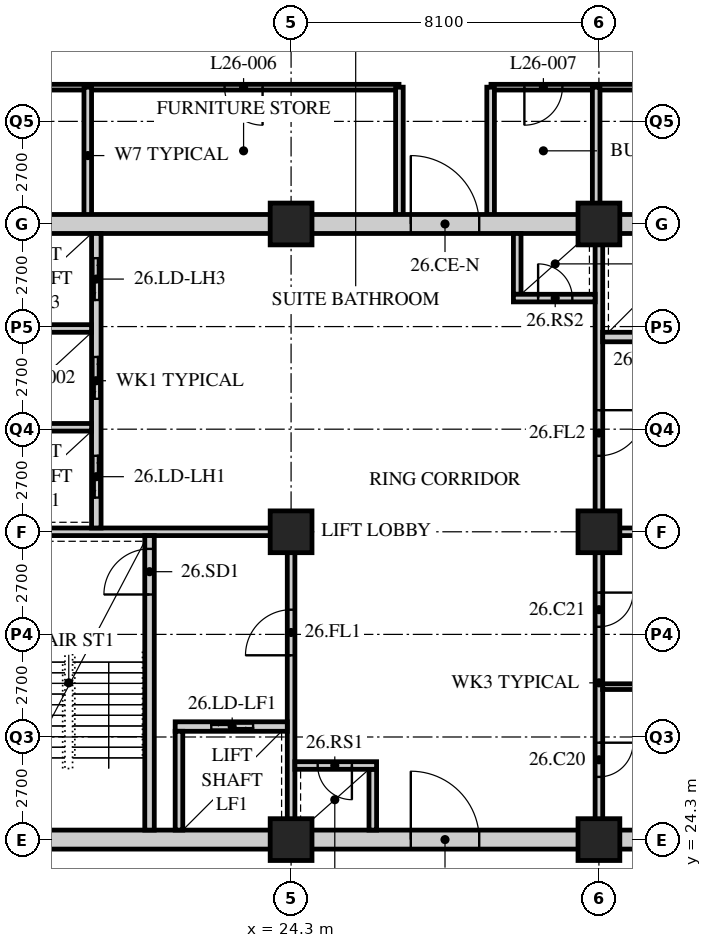
"""IFC4 building model, lengths in metres.
Left out: names, types, materials, properties, quantities, classifications, styles, units other than length and angle.
Written with IfcOpenShell. Run it as: python <this file> out.ifc"""

import sys

from ifc_helpers import new_model, si_unit, direction, frame, frame_2d, origin, origin_2d, place, context, subcontext, project, spatial, rectangle, hollow_rectangle, extrude, element, fill, save


model = new_model("IFC4")
c1 = context("Model", 3, precision=1e-05, world=origin(), true_north=direction((0.0, 1.0)))
c2 = subcontext(c1, "Body", "Model", "MODEL_VIEW")
j1 = project(units=[si_unit("LENGTHUNIT", "METRE"), si_unit("PLANEANGLEUNIT", "RADIAN")], contexts=[c1])
p1 = place(None, origin())
s1 = spatial("IfcSite", under=j1, at=p1, CompositionType="ELEMENT")
p2 = place(p1, origin())
s2 = spatial("IfcBuilding", under=s1, at=p2, CompositionType="ELEMENT")
p3 = place(p2, frame((0.0, 0.0, 106.8)))
s3 = spatial("IfcBuildingStorey", under=s2, at=p3, CompositionType="ELEMENT", Elevation=106.8)
for number, where, z_axis, x_axis in (
    (1, (24.3, 24.3, 0.0), (0.0, 0.0, 1.0), (1.0, 0.0, 0.0)),
    (2, (24.3, 32.4, 0.0), (0.0, 0.0, 1.0), (1.0, 0.0, 0.0)),
    (3, (24.3, 40.5, 0.0), (0.0, 0.0, 1.0), (1.0, 0.0, 0.0)),
    (4, (32.4, 24.3, 0.0), (0.0, 0.0, 1.0), (1.0, 0.0, 0.0)),
    (5, (32.4, 32.4, 0.0), (0.0, 0.0, 1.0), (1.0, 0.0, 0.0)),
    (6, (32.4, 40.5, 0.0), (0.0, 0.0, 1.0), (1.0, 0.0, 0.0)),
):
    element("IfcColumn", number, at=place(p3, frame(where, z_axis=z_axis, x_axis=x_axis)), inside=s3, PredefinedType="COLUMN", context=c2, shape_type="SweptSolid", body=[
        extrude(hollow_rectangle(XDim=1.1, YDim=1.1, WallThickness=0.1, at=origin_2d()), origin(), (0.0, 0.0, 1.0), 3.4),
    ])
p4 = place(p3, frame((42.75, 44.1, 0.0), z_axis=(0.0, 0.0, 1.0), x_axis=(-1.0, 0.0, 0.0)))
e7 = element("IfcWall", 7, at=p4, inside=s3, PredefinedType="PARTITIONING", context=c2, shape_type="SweptSolid", body=[
    extrude(rectangle(XDim=13.19, YDim=0.15, at=frame_2d((6.595, 0.0))), origin(), (0.0, 0.0, 1.0), 3.19),
])
p5 = place(p4, frame((11.311, 0.0, 0.0)))
e8 = element("IfcOpeningElement", 8, at=p5, cuts=e7, PredefinedType="OPENING", context=c2, shape_type="SweptSolid", body=[
    extrude(rectangle(XDim=1.0, YDim=2.1, at=frame_2d((0.5, 1.05))), frame((0.0, 0.085, 0.0), z_axis=(0.0, -1.0, 0.0), x_axis=(1.0, 0.0, 0.0)), (0.0, 0.0, 1.0), 0.17),
])
p6 = place(p4, frame((4.711, 0.0, 0.0)))
e9 = element("IfcOpeningElement", 9, at=p6, cuts=e7, PredefinedType="OPENING", context=c2, shape_type="SweptSolid", body=[
    extrude(rectangle(XDim=1.0, YDim=2.1, at=frame_2d((0.5, 1.05))), frame((0.0, 0.085, 0.0), z_axis=(0.0, -1.0, 0.0), x_axis=(1.0, 0.0, 0.0)), (0.0, 0.0, 1.0), 0.17),
])
p7 = place(p3, frame((27.14, 44.1, 0.0), z_axis=(0.0, 0.0, 1.0), x_axis=(-1.0, 0.0, 0.0)))
e10 = element("IfcWall", 10, at=p7, inside=s3, PredefinedType="PARTITIONING", context=c2, shape_type="SweptSolid", body=[
    extrude(rectangle(XDim=13.19, YDim=0.15, at=frame_2d((6.595, 0.0))), origin(), (0.0, 0.0, 1.0), 3.19),
])
p8 = place(p7, frame((10.19, 0.0, 0.0)))
e11 = element("IfcOpeningElement", 11, at=p8, cuts=e10, PredefinedType="OPENING", context=c2, shape_type="SweptSolid", body=[
    extrude(rectangle(XDim=1.0, YDim=2.1, at=frame_2d((0.5, 1.05))), frame((0.0, 0.085, 0.0), z_axis=(0.0, -1.0, 0.0), x_axis=(1.0, 0.0, 0.0)), (0.0, 0.0, 1.0), 0.17),
])
p9 = place(p7, frame((3.59, 0.0, 0.0)))
e12 = element("IfcOpeningElement", 12, at=p9, cuts=e10, PredefinedType="OPENING", context=c2, shape_type="SweptSolid", body=[
    extrude(rectangle(XDim=1.0, YDim=2.1, at=frame_2d((0.5, 1.05))), frame((0.0, 0.085, 0.0), z_axis=(0.0, -1.0, 0.0), x_axis=(1.0, 0.0, 0.0)), (0.0, 0.0, 1.0), 0.17),
])
p10 = place(p3, frame((18.95, 44.1, 0.0), z_axis=(0.0, 0.0, 1.0), x_axis=(0.0, -1.0, 0.0)))
e13 = element("IfcWall", 13, at=p10, inside=s3, PredefinedType="SOLIDWALL", context=c2, shape_type="SweptSolid", body=[
    extrude(rectangle(XDim=3.6, YDim=0.2, at=frame_2d((1.8, 0.0))), origin(), (0.0, 0.0, 1.0), 3.19),
])
p11 = place(p3, frame((32.328, 44.1, 0.0), z_axis=(0.0, 0.0, 1.0), x_axis=(0.0, -1.0, 0.0)))
e14 = element("IfcWall", 14, at=p11, inside=s3, PredefinedType="SOLIDWALL", context=c2, shape_type="SweptSolid", body=[
    extrude(rectangle(XDim=3.6, YDim=0.2, at=frame_2d((1.8, 0.0))), origin(), (0.0, 0.0, 1.0), 2.578),
])
for number, where, z_axis, x_axis in (
    (15, (27.15, 40.5, 0.0), (0.0, 0.0, 1.0), (0.0, 1.0, 0.0)),
    (16, (29.55, 40.5, 0.0), (0.0, 0.0, 1.0), (0.0, 1.0, 0.0)),
):
    element("IfcWall", number, at=place(p3, frame(where, z_axis=z_axis, x_axis=x_axis)), inside=s3, PredefinedType="SOLIDWALL", context=c2, shape_type="SweptSolid", body=[
        extrude(rectangle(XDim=3.6, YDim=0.2, at=frame_2d((1.8, 0.0))), origin(), (0.0, 0.0, 1.0), 3.19),
    ])
p12 = place(p3, frame((15.95, 24.3, 0.0), z_axis=(0.0, 0.0, 1.0), x_axis=(1.0, 0.0, 0.0)))
e17 = element("IfcWall", 17, at=p12, inside=s3, PredefinedType="SOLIDWALL", context=c2, shape_type="SweptSolid", body=[
    extrude(rectangle(XDim=24.8, YDim=0.5, at=frame_2d((12.4, 0.0))), origin(), (0.0, 0.0, 1.0), 2.54),
])
p13 = place(p12, frame((11.5, 0.0, 0.0)))
e18 = element("IfcOpeningElement", 18, at=p13, cuts=e17, PredefinedType="OPENING", context=c2, shape_type="SweptSolid", body=[
    extrude(rectangle(XDim=1.8, YDim=2.4, at=frame_2d((0.9, 1.2))), frame((0.0, 0.26, 0.0), z_axis=(0.0, -1.0, 0.0), x_axis=(1.0, 0.0, 0.0)), (0.0, 0.0, 1.0), 0.52),
])
p14 = place(p3, frame((15.95, 40.5, 0.0), z_axis=(0.0, 0.0, 1.0), x_axis=(1.0, 0.0, 0.0)))
e19 = element("IfcWall", 19, at=p14, inside=s3, PredefinedType="SOLIDWALL", context=c2, shape_type="SweptSolid", body=[
    extrude(rectangle(XDim=24.8, YDim=0.5, at=frame_2d((12.4, 0.0))), origin(), (0.0, 0.0, 1.0), 2.54),
])
p15 = place(p14, frame((11.5, 0.0, 0.0)))
e20 = element("IfcOpeningElement", 20, at=p15, cuts=e19, PredefinedType="OPENING", context=c2, shape_type="SweptSolid", body=[
    extrude(rectangle(XDim=1.8, YDim=2.4, at=frame_2d((0.9, 1.2))), frame((0.0, 0.26, 0.0), z_axis=(0.0, -1.0, 0.0), x_axis=(1.0, 0.0, 0.0)), (0.0, 0.0, 1.0), 0.52),
])
p16 = place(p3, frame((16.45, 32.4, 0.0), z_axis=(0.0, 0.0, 1.0), x_axis=(1.0, 0.0, 0.0)))
e21 = element("IfcWall", 21, at=p16, inside=s3, PredefinedType="SOLIDWALL", context=c2, shape_type="SweptSolid", body=[
    extrude(rectangle(XDim=7.95, YDim=0.2, at=frame_2d((3.975, 0.0))), origin(), (0.0, 0.0, 1.0), 2.578),
])
p17 = place(p3, frame((24.3, 24.55, 0.0), z_axis=(0.0, 0.0, 1.0), x_axis=(0.0, 1.0, 0.0)))
e22 = element("IfcWall", 22, at=p17, inside=s3, PredefinedType="SOLIDWALL", context=c2, shape_type="SweptSolid", body=[
    extrude(rectangle(XDim=7.75, YDim=0.2, at=frame_2d((3.875, 0.0))), origin(), (0.0, 0.0, 1.0), 2.578),
])
p18 = place(p17, frame((4.6, 0.0, 0.0)))
e23 = element("IfcOpeningElement", 23, at=p18, cuts=e22, PredefinedType="OPENING", context=c2, shape_type="SweptSolid", body=[
    extrude(rectangle(XDim=1.2, YDim=2.1, at=frame_2d((0.6, 1.05))), frame((0.0, 0.11, 0.0), z_axis=(0.0, -1.0, 0.0), x_axis=(1.0, 0.0, 0.0)), (0.0, 0.0, 1.0), 0.22),
])
p19 = place(p3, frame((20.575, 24.55, 0.0), z_axis=(0.0, 0.0, 1.0), x_axis=(0.0, 1.0, 0.0)))
e24 = element("IfcWall", 24, at=p19, inside=s3, PredefinedType="SOLIDWALL", context=c2, shape_type="SweptSolid", body=[
    extrude(rectangle(XDim=7.75, YDim=0.25, at=frame_2d((3.875, 0.0))), origin(), (0.0, 0.0, 1.0), 3.19),
])
p20 = place(p19, frame((6.2, 0.0, 0.0)))
e25 = element("IfcOpeningElement", 25, at=p20, cuts=e24, PredefinedType="OPENING", context=c2, shape_type="SweptSolid", body=[
    extrude(rectangle(XDim=1.2, YDim=2.1, at=frame_2d((0.6, 1.05))), frame((0.0, 0.135, 0.0), z_axis=(0.0, -1.0, 0.0), x_axis=(1.0, 0.0, 0.0)), (0.0, 0.0, 1.0), 0.27),
])
p21 = place(p3, frame((21.25, 27.275, 0.0), z_axis=(0.0, 0.0, 1.0), x_axis=(1.0, 0.0, 0.0)))
e26 = element("IfcWall", 26, at=p21, inside=s3, PredefinedType="SOLIDWALL", context=c2, shape_type="SweptSolid", body=[
    extrude(rectangle(XDim=2.95, YDim=0.25, at=frame_2d((1.475, 0.0))), origin(), (0.0, 0.0, 1.0), 3.19),
])
p22 = place(p21, frame((0.95, 0.0, 0.0)))
e27 = element("IfcOpeningElement", 27, at=p22, cuts=e26, PredefinedType="OPENING", context=c2, shape_type="SweptSolid", body=[
    extrude(rectangle(XDim=1.1, YDim=2.4, at=frame_2d((0.55, 1.2))), frame((0.0, 0.135, 0.0), z_axis=(0.0, -1.0, 0.0), x_axis=(1.0, 0.0, 0.0)), (0.0, 0.0, 1.0), 0.27),
])
p23 = place(p3, frame((21.35, 24.55, 0.0), z_axis=(0.0, 0.0, 1.0), x_axis=(0.0, 1.0, 0.0)))
e28 = element("IfcWall", 28, at=p23, inside=s3, PredefinedType="SOLIDWALL", context=c2, shape_type="SweptSolid", body=[
    extrude(rectangle(XDim=2.6, YDim=0.2, at=frame_2d((1.3, 0.0))), origin(), (0.0, 0.0, 1.0), 3.19),
])
p24 = place(p3, frame((19.175, 32.5, 0.0), z_axis=(0.0, 0.0, 1.0), x_axis=(0.0, 1.0, 0.0)))
e29 = element("IfcWall", 29, at=p24, inside=s3, PredefinedType="SOLIDWALL", context=c2, shape_type="SweptSolid", body=[
    extrude(rectangle(XDim=7.75, YDim=0.25, at=frame_2d((3.875, 0.0))), origin(), (0.0, 0.0, 1.0), 3.19),
])
p25 = place(p24, frame((0.8, 0.0, 0.0)))
e30 = element("IfcOpeningElement", 30, at=p25, cuts=e29, PredefinedType="OPENING", context=c2, shape_type="SweptSolid", body=[
    extrude(rectangle(XDim=1.1, YDim=2.4, at=frame_2d((0.55, 1.2))), frame((0.0, 0.135, 0.0), z_axis=(0.0, -1.0, 0.0), x_axis=(1.0, 0.0, 0.0)), (0.0, 0.0, 1.0), 0.27),
])
p26 = place(p24, frame((3.4, 0.0, 0.0)))
e31 = element("IfcOpeningElement", 31, at=p26, cuts=e29, PredefinedType="OPENING", context=c2, shape_type="SweptSolid", body=[
    extrude(rectangle(XDim=1.1, YDim=2.4, at=frame_2d((0.55, 1.2))), frame((0.0, 0.135, 0.0), z_axis=(0.0, -1.0, 0.0), x_axis=(1.0, 0.0, 0.0)), (0.0, 0.0, 1.0), 0.27),
])
p27 = place(p24, frame((6.0, 0.0, 0.0)))
e32 = element("IfcOpeningElement", 32, at=p27, cuts=e29, PredefinedType="OPENING", context=c2, shape_type="SweptSolid", body=[
    extrude(rectangle(XDim=1.1, YDim=2.4, at=frame_2d((0.55, 1.2))), frame((0.0, 0.135, 0.0), z_axis=(0.0, -1.0, 0.0), x_axis=(1.0, 0.0, 0.0)), (0.0, 0.0, 1.0), 0.27),
])
for number, where, z_axis, x_axis in (
    (33, (16.45, 35.15, 0.0), (0.0, 0.0, 1.0), (1.0, 0.0, 0.0)),
    (34, (16.45, 37.75, 0.0), (0.0, 0.0, 1.0), (1.0, 0.0, 0.0)),
):
    element("IfcWall", number, at=place(p3, frame(where, z_axis=z_axis, x_axis=x_axis)), inside=s3, PredefinedType="SOLIDWALL", context=c2, shape_type="SweptSolid", body=[
        extrude(rectangle(XDim=2.6, YDim=0.2, at=frame_2d((1.3, 0.0))), origin(), (0.0, 0.0, 1.0), 3.19),
    ])
p28 = place(p3, frame((26.45, 24.55, 0.0), z_axis=(0.0, 0.0, 1.0), x_axis=(0.0, 1.0, 0.0)))
e35 = element("IfcWall", 35, at=p28, inside=s3, PredefinedType="SOLIDWALL", context=c2, shape_type="SweptSolid", body=[
    extrude(rectangle(XDim=1.6, YDim=0.2, at=frame_2d((0.8, 0.0))), origin(), (0.0, 0.0, 1.0), 3.19),
])
p29 = place(p3, frame((24.4, 26.25, 0.0), z_axis=(0.0, 0.0, 1.0), x_axis=(1.0, 0.0, 0.0)))
e36 = element("IfcWall", 36, at=p29, inside=s3, PredefinedType="SOLIDWALL", context=c2, shape_type="SweptSolid", body=[
    extrude(rectangle(XDim=2.15, YDim=0.2, at=frame_2d((1.075, 0.0))), origin(), (0.0, 0.0, 1.0), 3.19),
])
p30 = place(p29, frame((0.6, 0.0, 0.0)))
e37 = element("IfcOpeningElement", 37, at=p30, cuts=e36, PredefinedType="OPENING", context=c2, shape_type="SweptSolid", body=[
    extrude(rectangle(XDim=0.9, YDim=2.1, at=frame_2d((0.45, 1.05))), frame((0.0, 0.11, 0.0), z_axis=(0.0, -1.0, 0.0), x_axis=(1.0, 0.0, 0.0)), (0.0, 0.0, 1.0), 0.22),
])
p31 = place(p3, frame((32.3, 32.4, 0.0), z_axis=(0.0, 0.0, 1.0), x_axis=(1.0, 0.0, 0.0)))
e38 = element("IfcWall", 38, at=p31, inside=s3, PredefinedType="SOLIDWALL", context=c2, shape_type="SweptSolid", body=[
    extrude(rectangle(XDim=7.95, YDim=0.2, at=frame_2d((3.975, 0.0))), origin(), (0.0, 0.0, 1.0), 2.578),
])
p32 = place(p3, frame((32.4, 32.5, 0.0), z_axis=(0.0, 0.0, 1.0), x_axis=(0.0, 1.0, 0.0)))
e39 = element("IfcWall", 39, at=p32, inside=s3, PredefinedType="SOLIDWALL", context=c2, shape_type="SweptSolid", body=[
    extrude(rectangle(XDim=7.75, YDim=0.2, at=frame_2d((3.875, 0.0))), origin(), (0.0, 0.0, 1.0), 2.578),
])
p33 = place(p32, frame((1.9, 0.0, 0.0)))
e40 = element("IfcOpeningElement", 40, at=p33, cuts=e39, PredefinedType="OPENING", context=c2, shape_type="SweptSolid", body=[
    extrude(rectangle(XDim=1.2, YDim=2.1, at=frame_2d((0.6, 1.05))), frame((0.0, 0.11, 0.0), z_axis=(0.0, -1.0, 0.0), x_axis=(1.0, 0.0, 0.0)), (0.0, 0.0, 1.0), 0.22),
])
p34 = place(p3, frame((32.5, 37.525, 0.0), z_axis=(0.0, 0.0, 1.0), x_axis=(1.0, 0.0, 0.0)))
e41 = element("IfcWall", 41, at=p34, inside=s3, PredefinedType="SOLIDWALL", context=c2, shape_type="SweptSolid", body=[
    extrude(rectangle(XDim=2.95, YDim=0.25, at=frame_2d((1.475, 0.0))), origin(), (0.0, 0.0, 1.0), 3.19),
])
p35 = place(p34, frame((0.9, 0.0, 0.0)))
e42 = element("IfcOpeningElement", 42, at=p35, cuts=e41, PredefinedType="OPENING", context=c2, shape_type="SweptSolid", body=[
    extrude(rectangle(XDim=1.1, YDim=2.4, at=frame_2d((0.55, 1.2))), frame((0.0, 0.135, 0.0), z_axis=(0.0, -1.0, 0.0), x_axis=(1.0, 0.0, 0.0)), (0.0, 0.0, 1.0), 0.27),
])
p36 = place(p3, frame((30.25, 38.65, 0.0), z_axis=(0.0, 0.0, 1.0), x_axis=(0.0, 1.0, 0.0)))
e43 = element("IfcWall", 43, at=p36, inside=s3, PredefinedType="SOLIDWALL", context=c2, shape_type="SweptSolid", body=[
    extrude(rectangle(XDim=1.6, YDim=0.2, at=frame_2d((0.8, 0.0))), origin(), (0.0, 0.0, 1.0), 3.19),
])
p37 = place(p3, frame((30.15, 38.55, 0.0), z_axis=(0.0, 0.0, 1.0), x_axis=(1.0, 0.0, 0.0)))
e44 = element("IfcWall", 44, at=p37, inside=s3, PredefinedType="SOLIDWALL", context=c2, shape_type="SweptSolid", body=[
    extrude(rectangle(XDim=2.15, YDim=0.2, at=frame_2d((1.075, 0.0))), origin(), (0.0, 0.0, 1.0), 3.19),
])
p38 = place(p37, frame((0.65, 0.0, 0.0)))
e45 = element("IfcOpeningElement", 45, at=p38, cuts=e44, PredefinedType="OPENING", context=c2, shape_type="SweptSolid", body=[
    extrude(rectangle(XDim=0.9, YDim=2.1, at=frame_2d((0.45, 1.05))), frame((0.0, 0.11, 0.0), z_axis=(0.0, -1.0, 0.0), x_axis=(1.0, 0.0, 0.0)), (0.0, 0.0, 1.0), 0.22),
])
p39 = place(p3, frame((32.4, 24.55, 0.0), z_axis=(0.0, 0.0, 1.0), x_axis=(0.0, 1.0, 0.0)))
e46 = element("IfcWall", 46, at=p39, inside=s3, PredefinedType="PARTITIONING", context=c2, shape_type="SweptSolid", body=[
    extrude(rectangle(XDim=7.75, YDim=0.2, at=frame_2d((3.875, 0.0))), origin(), (0.0, 0.0, 1.0), 2.578),
])
p40 = place(p39, frame((1.4, 0.0, 0.0)))
e47 = element("IfcOpeningElement", 47, at=p40, cuts=e46, PredefinedType="OPENING", context=c2, shape_type="SweptSolid", body=[
    extrude(rectangle(XDim=0.9, YDim=2.1, at=frame_2d((0.45, 1.05))), frame((0.0, 0.11, 0.0), z_axis=(0.0, -1.0, 0.0), x_axis=(1.0, 0.0, 0.0)), (0.0, 0.0, 1.0), 0.22),
])
p41 = place(p39, frame((5.35, 0.0, 0.0)))
e48 = element("IfcOpeningElement", 48, at=p41, cuts=e46, PredefinedType="OPENING", context=c2, shape_type="SweptSolid", body=[
    extrude(rectangle(XDim=0.9, YDim=2.1, at=frame_2d((0.45, 1.05))), frame((0.0, 0.11, 0.0), z_axis=(0.0, -1.0, 0.0), x_axis=(1.0, 0.0, 0.0)), (0.0, 0.0, 1.0), 0.22),
])
p42 = place(p3, frame((32.5, 28.325, 0.0), z_axis=(0.0, 0.0, 1.0), x_axis=(1.0, 0.0, 0.0)))
e49 = element("IfcWall", 49, at=p42, inside=s3, PredefinedType="PARTITIONING", context=c2, shape_type="SweptSolid", body=[
    extrude(rectangle(XDim=4.9, YDim=0.15, at=frame_2d((2.45, 0.0))), origin(), (0.0, 0.0, 1.0), 3.19),
])
p43 = place(p9, origin())
e50 = element("IfcDoor", 50, at=p43, inside=s3, OperationType="SINGLE_SWING_LEFT", PredefinedType="DOOR", context=c2, shape_type="SweptSolid", body=[
    extrude(rectangle(XDim=1.0, YDim=2.1, at=frame_2d((0.5, 1.05))), frame((0.0, 0.025, 0.0), z_axis=(0.0, -1.0, 0.0), x_axis=(1.0, 0.0, 0.0)), (0.0, 0.0, 1.0), 0.05),
])
fill(e12, e50)
p44 = place(p5, origin())
e51 = element("IfcDoor", 51, at=p44, inside=s3, OperationType="SINGLE_SWING_RIGHT", PredefinedType="DOOR", context=c2, shape_type="SweptSolid", body=[
    extrude(rectangle(XDim=1.0, YDim=2.1, at=frame_2d((0.5, 1.05))), frame((0.0, 0.025, 0.0), z_axis=(0.0, -1.0, 0.0), x_axis=(1.0, 0.0, 0.0)), (0.0, 0.0, 1.0), 0.05),
])
fill(e8, e51)
p45 = place(p40, origin())
e52 = element("IfcDoor", 52, at=p45, inside=s3, OperationType="SINGLE_SWING_LEFT", PredefinedType="DOOR", context=c2, shape_type="SweptSolid", body=[
    extrude(rectangle(XDim=0.9, YDim=2.1, at=frame_2d((0.45, 1.05))), frame((0.0, 0.025, 0.0), z_axis=(0.0, -1.0, 0.0), x_axis=(1.0, 0.0, 0.0)), (0.0, 0.0, 1.0), 0.05),
])
fill(e47, e52)
p46 = place(p41, origin())
e53 = element("IfcDoor", 53, at=p46, inside=s3, OperationType="SINGLE_SWING_LEFT", PredefinedType="DOOR", context=c2, shape_type="SweptSolid", body=[
    extrude(rectangle(XDim=0.9, YDim=2.1, at=frame_2d((0.45, 1.05))), frame((0.0, 0.025, 0.0), z_axis=(0.0, -1.0, 0.0), x_axis=(1.0, 0.0, 0.0)), (0.0, 0.0, 1.0), 0.05),
])
fill(e48, e53)
p47 = place(p20, origin())
e54 = element("IfcDoor", 54, at=p47, inside=s3, OperationType="SINGLE_SWING_LEFT", PredefinedType="DOOR", context=c2, shape_type="SweptSolid", body=[
    extrude(rectangle(XDim=1.2, YDim=2.1, at=frame_2d((0.6, 1.05))), frame((0.0, 0.025, 0.0), z_axis=(0.0, -1.0, 0.0), x_axis=(1.0, 0.0, 0.0)), (0.0, 0.0, 1.0), 0.05),
])
fill(e25, e54)
p48 = place(p18, origin())
e55 = element("IfcDoor", 55, at=p48, inside=s3, OperationType="SINGLE_SWING_LEFT", PredefinedType="DOOR", context=c2, shape_type="SweptSolid", body=[
    extrude(rectangle(XDim=1.2, YDim=2.1, at=frame_2d((0.6, 1.05))), frame((0.0, 0.025, 0.0), z_axis=(0.0, -1.0, 0.0), x_axis=(1.0, 0.0, 0.0)), (0.0, 0.0, 1.0), 0.05),
])
fill(e23, e55)
p49 = place(p30, origin())
e56 = element("IfcDoor", 56, at=p49, inside=s3, OperationType="SINGLE_SWING_LEFT", PredefinedType="DOOR", context=c2, shape_type="SweptSolid", body=[
    extrude(rectangle(XDim=0.9, YDim=2.1, at=frame_2d((0.45, 1.05))), frame((0.0, 0.025, 0.0), z_axis=(0.0, -1.0, 0.0), x_axis=(1.0, 0.0, 0.0)), (0.0, 0.0, 1.0), 0.05),
])
fill(e37, e56)
p50 = place(p33, origin())
e57 = element("IfcDoor", 57, at=p50, inside=s3, OperationType="SINGLE_SWING_LEFT", PredefinedType="DOOR", context=c2, shape_type="SweptSolid", body=[
    extrude(rectangle(XDim=1.2, YDim=2.1, at=frame_2d((0.6, 1.05))), frame((0.0, 0.025, 0.0), z_axis=(0.0, -1.0, 0.0), x_axis=(1.0, 0.0, 0.0)), (0.0, 0.0, 1.0), 0.05),
])
fill(e40, e57)
p51 = place(p38, origin())
e58 = element("IfcDoor", 58, at=p51, inside=s3, OperationType="SINGLE_SWING_LEFT", PredefinedType="DOOR", context=c2, shape_type="SweptSolid", body=[
    extrude(rectangle(XDim=0.9, YDim=2.1, at=frame_2d((0.45, 1.05))), frame((0.0, 0.025, 0.0), z_axis=(0.0, -1.0, 0.0), x_axis=(1.0, 0.0, 0.0)), (0.0, 0.0, 1.0), 0.05),
])
fill(e45, e58)
p52 = place(p25, origin())
e59 = element("IfcDoor", 59, at=p52, inside=s3, OperationType="DOUBLE_DOOR_SLIDING", PredefinedType="DOOR", context=c2, shape_type="SweptSolid", body=[
    extrude(rectangle(XDim=1.1, YDim=2.4, at=frame_2d((0.55, 1.2))), frame((0.0, 0.025, 0.0), z_axis=(0.0, -1.0, 0.0), x_axis=(1.0, 0.0, 0.0)), (0.0, 0.0, 1.0), 0.05),
])
fill(e30, e59)
p53 = place(p26, origin())
e60 = element("IfcDoor", 60, at=p53, inside=s3, OperationType="DOUBLE_DOOR_SLIDING", PredefinedType="DOOR", context=c2, shape_type="SweptSolid", body=[
    extrude(rectangle(XDim=1.1, YDim=2.4, at=frame_2d((0.55, 1.2))), frame((0.0, 0.025, 0.0), z_axis=(0.0, -1.0, 0.0), x_axis=(1.0, 0.0, 0.0)), (0.0, 0.0, 1.0), 0.05),
])
fill(e31, e60)
p54 = place(p27, origin())
e61 = element("IfcDoor", 61, at=p54, inside=s3, OperationType="DOUBLE_DOOR_SLIDING", PredefinedType="DOOR", context=c2, shape_type="SweptSolid", body=[
    extrude(rectangle(XDim=1.1, YDim=2.4, at=frame_2d((0.55, 1.2))), frame((0.0, 0.025, 0.0), z_axis=(0.0, -1.0, 0.0), x_axis=(1.0, 0.0, 0.0)), (0.0, 0.0, 1.0), 0.05),
])
fill(e32, e61)
p55 = place(p22, origin())
e62 = element("IfcDoor", 62, at=p55, inside=s3, OperationType="DOUBLE_DOOR_SLIDING", PredefinedType="DOOR", context=c2, shape_type="SweptSolid", body=[
    extrude(rectangle(XDim=1.1, YDim=2.4, at=frame_2d((0.55, 1.2))), frame((0.0, 0.025, 0.0), z_axis=(0.0, -1.0, 0.0), x_axis=(1.0, 0.0, 0.0)), (0.0, 0.0, 1.0), 0.05),
])
fill(e27, e62)
p56 = place(p13, origin())
e63 = element("IfcDoor", 63, at=p56, inside=s3, OperationType="DOUBLE_DOOR_SINGLE_SWING", PredefinedType="DOOR", context=c2, shape_type="SweptSolid", body=[
    extrude(rectangle(XDim=1.8, YDim=2.4, at=frame_2d((0.9, 1.2))), frame((0.0, 0.025, 0.0), z_axis=(0.0, -1.0, 0.0), x_axis=(1.0, 0.0, 0.0)), (0.0, 0.0, 1.0), 0.05),
])
fill(e18, e63)
p57 = place(p15, origin())
e64 = element("IfcDoor", 64, at=p57, inside=s3, OperationType="DOUBLE_DOOR_SINGLE_SWING", PredefinedType="DOOR", context=c2, shape_type="SweptSolid", body=[
    extrude(rectangle(XDim=1.8, YDim=2.4, at=frame_2d((0.9, 1.2))), frame((0.0, 0.025, 0.0), z_axis=(0.0, -1.0, 0.0), x_axis=(1.0, 0.0, 0.0)), (0.0, 0.0, 1.0), 0.05),
])
fill(e20, e64)
save(model, sys.argv[1])
